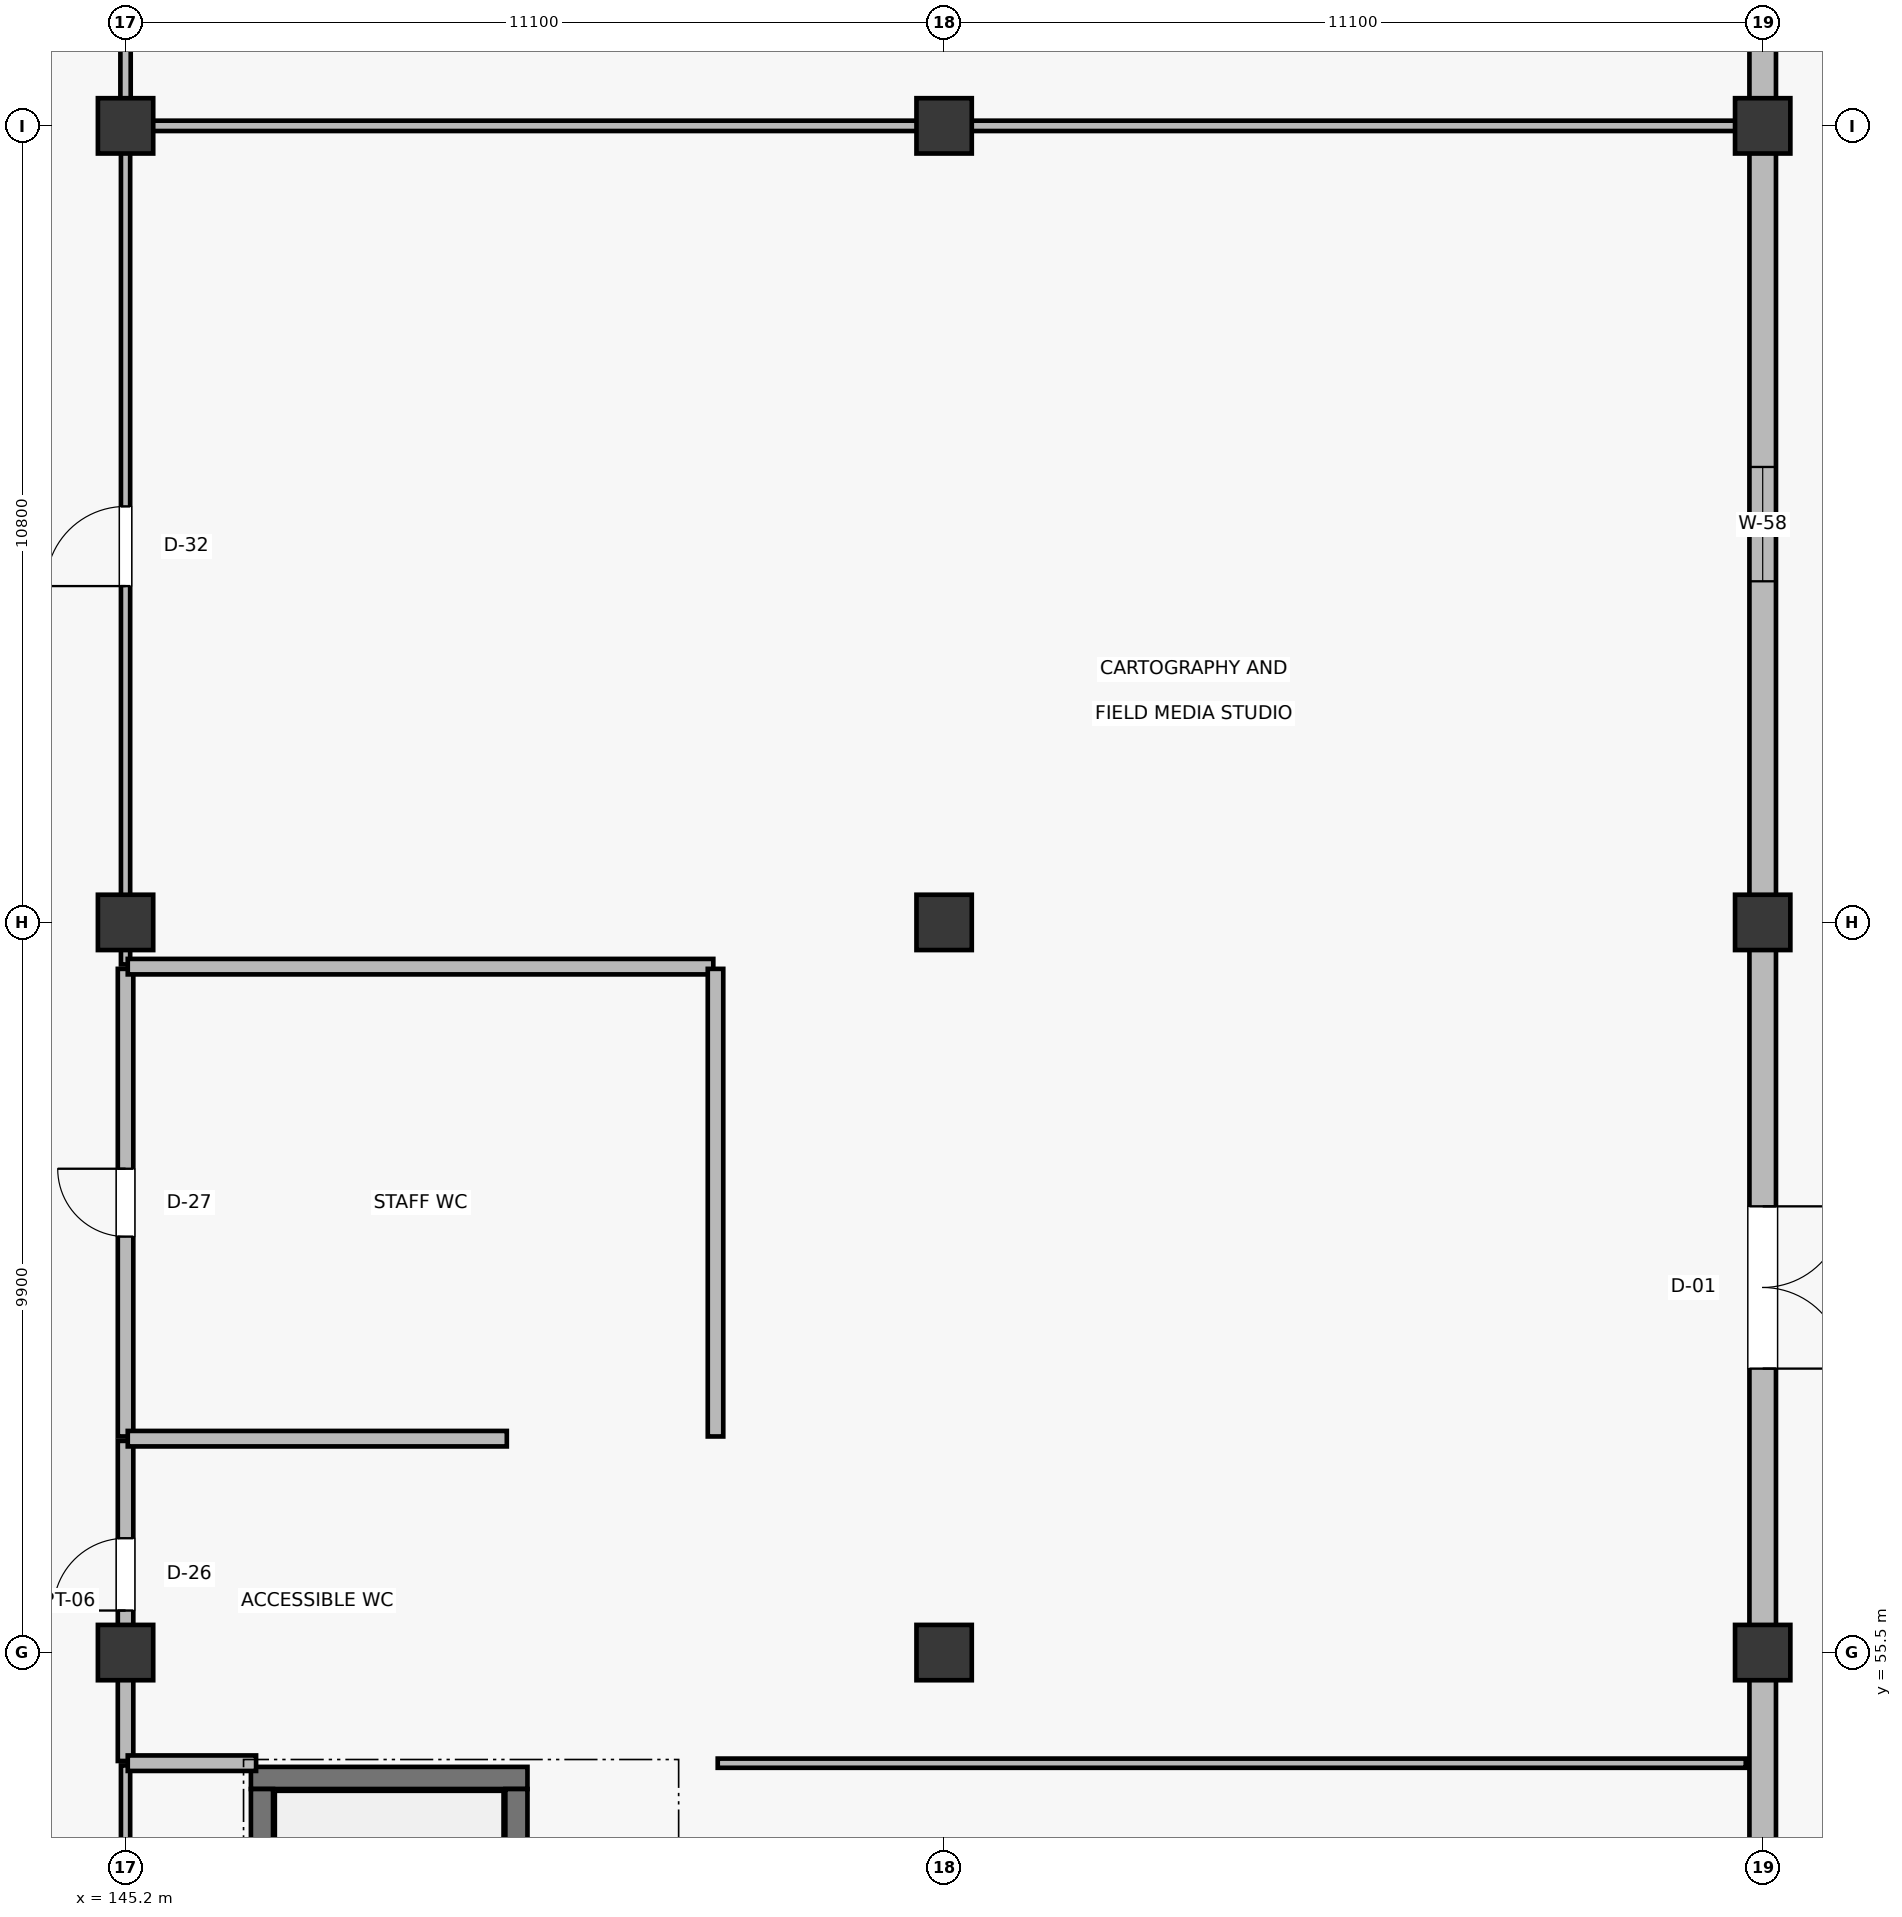
"""IFC4 building model, lengths in metres.
Left out: names, types, materials, properties, quantities, classifications, styles, units other than length and angle.
Written with IfcOpenShell. Run it as: python <this file> out.ifc"""

import sys

from ifc_helpers import new_model, si_unit, direction, frame, frame_2d, origin, origin_2d, place, context, subcontext, project, spatial, rectangle, extrude, element, fill, save


model = new_model("IFC4")
c1 = context("Model", 3, precision=1e-05, world=origin(), true_north=direction((0.0, 1.0)))
c2 = subcontext(c1, "Body", "Model", "MODEL_VIEW")
j1 = project(units=[si_unit("LENGTHUNIT", "METRE"), si_unit("PLANEANGLEUNIT", "RADIAN")], contexts=[c1])
p1 = place(None, origin())
s1 = spatial("IfcSite", under=j1, at=p1, CompositionType="ELEMENT")
p2 = place(p1, origin())
s2 = spatial("IfcBuilding", under=s1, at=p2, CompositionType="ELEMENT")
p3 = place(p2, origin())
s3 = spatial("IfcBuildingStorey", under=s2, at=p3, CompositionType="ELEMENT", Elevation=0.0)
for number, where, z_axis, x_axis in (
    (1, (145.2, 55.5, 0.0), (0.0, 0.0, 1.0), (1.0, 0.0, 0.0)),
    (2, (145.2, 65.4, 0.0), (0.0, 0.0, 1.0), (1.0, 0.0, 0.0)),
    (3, (145.2, 76.2, 0.0), (0.0, 0.0, 1.0), (1.0, 0.0, 0.0)),
    (4, (156.3, 55.5, 0.0), (0.0, 0.0, 1.0), (1.0, 0.0, 0.0)),
    (5, (156.3, 65.4, 0.0), (0.0, 0.0, 1.0), (1.0, 0.0, 0.0)),
    (6, (156.3, 76.2, 0.0), (0.0, 0.0, 1.0), (1.0, 0.0, 0.0)),
    (7, (167.4, 55.5, 0.0), (0.0, 0.0, 1.0), (1.0, 0.0, 0.0)),
    (8, (167.4, 65.4, 0.0), (0.0, 0.0, 1.0), (1.0, 0.0, 0.0)),
    (9, (167.4, 76.2, 0.0), (0.0, 0.0, 1.0), (1.0, 0.0, 0.0)),
):
    element("IfcColumn", number, at=place(p3, frame(where, z_axis=z_axis, x_axis=x_axis)), inside=s3, PredefinedType="COLUMN", context=c2, shape_type="SweptSolid", body=[
        extrude(rectangle(XDim=0.75, YDim=0.75, at=origin_2d()), origin(), (0.0, 0.0, 1.0), 5.4),
    ])
p4 = place(p3, frame((167.4, 45.965, 0.0), z_axis=(0.0, 0.0, 1.0), x_axis=(0.0, 1.0, 0.0)))
e10 = element("IfcWall", 10, at=p4, inside=s3, PredefinedType="SOLIDWALL", context=c2, shape_type="SweptSolid", body=[
    extrude(rectangle(XDim=9.17, YDim=0.36, at=frame_2d((4.585, 0.0))), origin(), (0.0, 0.0, 1.0), 4.415),
])
p5 = place(p4, frame((3.81, 0.0, 0.85)))
e11 = element("IfcOpeningElement", 11, at=p5, cuts=e10, PredefinedType="OPENING", context=c2, shape_type="SweptSolid", body=[
    extrude(rectangle(XDim=1.55, YDim=1.15, at=frame_2d((0.775, 0.575))), frame((0.0, 0.19, 0.0), z_axis=(0.0, -1.0, 0.0), x_axis=(1.0, 0.0, 0.0)), (0.0, 0.0, 1.0), 0.38),
])
p6 = place(p3, frame((167.4, 55.865, 0.0), z_axis=(0.0, 0.0, 1.0), x_axis=(0.0, 1.0, 0.0)))
e12 = element("IfcWall", 12, at=p6, inside=s3, PredefinedType="SOLIDWALL", context=c2, shape_type="SweptSolid", body=[
    extrude(rectangle(XDim=9.17, YDim=0.36, at=frame_2d((4.585, 0.0))), origin(), (0.0, 0.0, 1.0), 4.415),
])
p7 = place(p6, frame((3.485, 0.0, 0.0)))
e13 = element("IfcOpeningElement", 13, at=p7, cuts=e12, PredefinedType="OPENING", context=c2, shape_type="SweptSolid", body=[
    extrude(rectangle(XDim=2.2, YDim=2.5, at=frame_2d((1.1, 1.25))), frame((0.0, 0.19, 0.0), z_axis=(0.0, -1.0, 0.0), x_axis=(1.0, 0.0, 0.0)), (0.0, 0.0, 1.0), 0.38),
])
p8 = place(p3, frame((167.4, 65.765, 0.0), z_axis=(0.0, 0.0, 1.0), x_axis=(0.0, 1.0, 0.0)))
e14 = element("IfcWall", 14, at=p8, inside=s3, PredefinedType="SOLIDWALL", context=c2, shape_type="SweptSolid", body=[
    extrude(rectangle(XDim=10.07, YDim=0.36, at=frame_2d((5.035, 0.0))), origin(), (0.0, 0.0, 1.0), 4.415),
])
p9 = place(p8, frame((4.26, 0.0, 0.85)))
e15 = element("IfcOpeningElement", 15, at=p9, cuts=e14, PredefinedType="OPENING", context=c2, shape_type="SweptSolid", body=[
    extrude(rectangle(XDim=1.55, YDim=1.35, at=frame_2d((0.775, 0.675))), frame((0.0, 0.19, 0.0), z_axis=(0.0, -1.0, 0.0), x_axis=(1.0, 0.0, 0.0)), (0.0, 0.0, 1.0), 0.38),
])
p10 = place(p3, frame((167.4, 76.565, 0.0), z_axis=(0.0, 0.0, 1.0), x_axis=(0.0, 1.0, 0.0)))
e16 = element("IfcWall", 16, at=p10, inside=s3, PredefinedType="SOLIDWALL", context=c2, shape_type="SweptSolid", body=[
    extrude(rectangle(XDim=6.58, YDim=0.36, at=frame_2d((3.29, 0.0))), origin(), (0.0, 0.0, 1.0), 4.445),
])
p11 = place(p10, frame((2.715, 0.0, 0.85)))
e17 = element("IfcOpeningElement", 17, at=p11, cuts=e16, PredefinedType="OPENING", context=c2, shape_type="SweptSolid", body=[
    extrude(rectangle(XDim=1.15, YDim=1.35, at=frame_2d((0.575, 0.675))), frame((0.0, 0.19, 0.0), z_axis=(0.0, -1.0, 0.0), x_axis=(1.0, 0.0, 0.0)), (0.0, 0.0, 1.0), 0.38),
])
p12 = place(p3, frame((146.9, 53.8, 0.0), z_axis=(0.0, 0.0, 1.0), x_axis=(1.0, 0.0, 0.0)))
e18 = element("IfcWall", 18, at=p12, inside=s3, PredefinedType="SHEAR", context=c2, shape_type="SweptSolid", body=[
    extrude(rectangle(XDim=3.75, YDim=0.3, at=frame_2d((1.875, 0.0))), origin(), (0.0, 0.0, 1.0), 5.18),
])
for number, where, z_axis, x_axis in (
    (19, (147.05, 46.6, 0.0), (0.0, 0.0, 1.0), (0.0, 1.0, 0.0)),
    (20, (150.5, 46.6, 0.0), (0.0, 0.0, 1.0), (0.0, 1.0, 0.0)),
):
    element("IfcWall", number, at=place(p3, frame(where, z_axis=z_axis, x_axis=x_axis)), inside=s3, PredefinedType="SHEAR", context=c2, shape_type="SweptSolid", body=[
        extrude(rectangle(XDim=7.05, YDim=0.3, at=frame_2d((3.525, 0.0))), origin(), (0.0, 0.0, 1.0), 5.18),
    ])
p13 = place(p3, frame((145.2, 54.03, 0.0), z_axis=(0.0, 0.0, 1.0), x_axis=(0.0, 1.0, 0.0)))
e21 = element("IfcWall", 21, at=p13, inside=s3, PredefinedType="PLUMBINGWALL", context=c2, shape_type="SweptSolid", body=[
    extrude(rectangle(XDim=4.34, YDim=0.21, at=frame_2d((2.17, 0.0))), origin(), (0.0, 0.0, 1.0), 4.265),
])
p14 = place(p13, frame((2.04, 0.0, 0.0)))
e22 = element("IfcOpeningElement", 22, at=p14, cuts=e21, PredefinedType="OPENING", context=c2, shape_type="SweptSolid", body=[
    extrude(rectangle(XDim=0.98, YDim=2.1, at=frame_2d((0.49, 1.05))), frame((0.0, 0.115, 0.0), z_axis=(0.0, -1.0, 0.0), x_axis=(1.0, 0.0, 0.0)), (0.0, 0.0, 1.0), 0.23),
])
p15 = place(p3, frame((145.2, 58.43, 0.0), z_axis=(0.0, 0.0, 1.0), x_axis=(0.0, 1.0, 0.0)))
e23 = element("IfcWall", 23, at=p15, inside=s3, PredefinedType="PLUMBINGWALL", context=c2, shape_type="SweptSolid", body=[
    extrude(rectangle(XDim=6.34, YDim=0.21, at=frame_2d((3.17, 0.0))), origin(), (0.0, 0.0, 1.0), 4.265),
])
p16 = place(p15, frame((2.71, 0.0, 0.0)))
e24 = element("IfcOpeningElement", 24, at=p16, cuts=e23, PredefinedType="OPENING", context=c2, shape_type="SweptSolid", body=[
    extrude(rectangle(XDim=0.92, YDim=2.1, at=frame_2d((0.46, 1.05))), frame((0.0, 0.115, 0.0), z_axis=(0.0, -1.0, 0.0), x_axis=(1.0, 0.0, 0.0)), (0.0, 0.0, 1.0), 0.23),
])
p17 = place(p3, frame((145.2, 64.83, 0.0), z_axis=(0.0, 0.0, 1.0), x_axis=(0.0, 1.0, 0.0)))
e25 = element("IfcWall", 25, at=p17, inside=s3, PredefinedType="PARTITIONING", context=c2, shape_type="SweptSolid", body=[
    extrude(rectangle(XDim=11.34, YDim=0.125, at=frame_2d((5.67, 0.0))), origin(), (0.0, 0.0, 1.0), 4.265),
])
p18 = place(p17, frame((5.13, 0.0, 0.0)))
e26 = element("IfcOpeningElement", 26, at=p18, cuts=e25, PredefinedType="OPENING", context=c2, shape_type="SweptSolid", body=[
    extrude(rectangle(XDim=1.08, YDim=2.15, at=frame_2d((0.54, 1.075))), frame((0.0, 0.073, 0.0), z_axis=(0.0, -1.0, 0.0), x_axis=(1.0, 0.0, 0.0)), (0.0, 0.0, 1.0), 0.145),
])
p19 = place(p3, frame((145.2, 76.23, 0.0), z_axis=(0.0, 0.0, 1.0), x_axis=(0.0, 1.0, 0.0)))
e27 = element("IfcWall", 27, at=p19, inside=s3, PredefinedType="PARTITIONING", context=c2, shape_type="SweptSolid", body=[
    extrude(rectangle(XDim=23.94, YDim=0.14, at=frame_2d((11.97, 0.0))), origin(), (0.0, 0.0, 1.0), 4.495),
])
p20 = place(p19, frame((11.395, 0.0, 0.0)))
e28 = element("IfcOpeningElement", 28, at=p20, cuts=e27, PredefinedType="OPENING", context=c2, shape_type="SweptSolid", body=[
    extrude(rectangle(XDim=1.15, YDim=2.15, at=frame_2d((0.575, 1.075))), frame((0.0, 0.08, 0.0), z_axis=(0.0, -1.0, 0.0), x_axis=(1.0, 0.0, 0.0)), (0.0, 0.0, 1.0), 0.16),
])
p21 = place(p3, frame((145.2, 46.48, 0.0), z_axis=(0.0, 0.0, 1.0), x_axis=(0.0, 1.0, 0.0)))
e29 = element("IfcWall", 29, at=p21, inside=s3, PredefinedType="PARTITIONING", context=c2, shape_type="SweptSolid", body=[
    extrude(rectangle(XDim=7.49, YDim=0.125, at=frame_2d((3.745, 0.0))), origin(), (0.0, 0.0, 1.0), 4.265),
])
p22 = place(p21, frame((3.245, 0.0, 0.0)))
e30 = element("IfcOpeningElement", 30, at=p22, cuts=e29, PredefinedType="OPENING", context=c2, shape_type="SweptSolid", body=[
    extrude(rectangle(XDim=1.0, YDim=2.15, at=frame_2d((0.5, 1.075))), frame((0.0, 0.073, 0.0), z_axis=(0.0, -1.0, 0.0), x_axis=(1.0, 0.0, 0.0)), (0.0, 0.0, 1.0), 0.145),
])
p23 = place(p3, frame((153.23, 54.0, 0.0), z_axis=(0.0, 0.0, 1.0), x_axis=(1.0, 0.0, 0.0)))
e31 = element("IfcWall", 31, at=p23, inside=s3, PredefinedType="PARTITIONING", context=c2, shape_type="SweptSolid", body=[
    extrude(rectangle(XDim=13.94, YDim=0.125, at=frame_2d((6.97, 0.0))), origin(), (0.0, 0.0, 1.0), 4.265),
])
p24 = place(p3, frame((145.23, 58.4, 0.0), z_axis=(0.0, 0.0, 1.0), x_axis=(1.0, 0.0, 0.0)))
e32 = element("IfcWall", 32, at=p24, inside=s3, PredefinedType="PLUMBINGWALL", context=c2, shape_type="SweptSolid", body=[
    extrude(rectangle(XDim=5.14, YDim=0.21, at=frame_2d((2.57, 0.0))), origin(), (0.0, 0.0, 1.0), 4.265),
])
p25 = place(p3, frame((145.23, 54.0, 0.0), z_axis=(0.0, 0.0, 1.0), x_axis=(1.0, 0.0, 0.0)))
e33 = element("IfcWall", 33, at=p25, inside=s3, PredefinedType="PLUMBINGWALL", context=c2, shape_type="SweptSolid", body=[
    extrude(rectangle(XDim=1.74, YDim=0.21, at=frame_2d((0.87, 0.0))), origin(), (0.0, 0.0, 1.0), 4.265),
])
p26 = place(p3, frame((145.23, 64.8, 0.0), z_axis=(0.0, 0.0, 1.0), x_axis=(1.0, 0.0, 0.0)))
e34 = element("IfcWall", 34, at=p26, inside=s3, PredefinedType="PLUMBINGWALL", context=c2, shape_type="SweptSolid", body=[
    extrude(rectangle(XDim=7.94, YDim=0.21, at=frame_2d((3.97, 0.0))), origin(), (0.0, 0.0, 1.0), 4.265),
])
p27 = place(p3, frame((153.2, 58.43, 0.0), z_axis=(0.0, 0.0, 1.0), x_axis=(0.0, 1.0, 0.0)))
e35 = element("IfcWall", 35, at=p27, inside=s3, PredefinedType="PLUMBINGWALL", context=c2, shape_type="SweptSolid", body=[
    extrude(rectangle(XDim=6.34, YDim=0.21, at=frame_2d((3.17, 0.0))), origin(), (0.0, 0.0, 1.0), 5.08),
])
p28 = place(p3, frame((145.23, 76.2, 0.0), z_axis=(0.0, 0.0, 1.0), x_axis=(1.0, 0.0, 0.0)))
e36 = element("IfcWall", 36, at=p28, inside=s3, PredefinedType="PARTITIONING", context=c2, shape_type="SweptSolid", body=[
    extrude(rectangle(XDim=21.94, YDim=0.14, at=frame_2d((10.97, 0.0))), origin(), (0.0, 0.0, 1.0), 4.095),
])
p29 = place(p7, frame((2.2, 0.0, 0.0), z_axis=(0.0, 0.0, 1.0), x_axis=(-1.0, 0.0, 0.0)))
e37 = element("IfcDoor", 37, at=p29, inside=s3, OperationType="DOUBLE_DOOR_SINGLE_SWING", PredefinedType="DOOR", context=c2, shape_type="SweptSolid", body=[
    extrude(rectangle(XDim=2.2, YDim=2.5, at=frame_2d((1.1, 1.25))), frame((0.0, 0.025, 0.0), z_axis=(0.0, -1.0, 0.0), x_axis=(1.0, 0.0, 0.0)), (0.0, 0.0, 1.0), 0.05),
])
fill(e13, e37)
p30 = place(p9, frame((1.55, 0.0, 0.0), z_axis=(0.0, 0.0, 1.0), x_axis=(-1.0, 0.0, 0.0)))
e38 = element("IfcWindow", 38, at=p30, inside=s3, PartitioningType="DOUBLE_PANEL_VERTICAL", PredefinedType="WINDOW", context=c2, shape_type="SweptSolid", body=[
    extrude(rectangle(XDim=1.55, YDim=1.35, at=frame_2d((0.775, 0.675))), frame((0.0, 0.03, 0.0), z_axis=(0.0, -1.0, 0.0), x_axis=(1.0, 0.0, 0.0)), (0.0, 0.0, 1.0), 0.06),
])
fill(e15, e38)
p31 = place(p14, origin())
e39 = element("IfcDoor", 39, at=p31, inside=s3, OperationType="SINGLE_SWING_LEFT", PredefinedType="DOOR", context=c2, shape_type="SweptSolid", body=[
    extrude(rectangle(XDim=0.98, YDim=2.1, at=frame_2d((0.49, 1.05))), frame((0.0, 0.025, 0.0), z_axis=(0.0, -1.0, 0.0), x_axis=(1.0, 0.0, 0.0)), (0.0, 0.0, 1.0), 0.05),
])
fill(e22, e39)
p32 = place(p16, origin())
e40 = element("IfcDoor", 40, at=p32, inside=s3, OperationType="SINGLE_SWING_RIGHT", PredefinedType="DOOR", context=c2, shape_type="SweptSolid", body=[
    extrude(rectangle(XDim=0.92, YDim=2.1, at=frame_2d((0.46, 1.05))), frame((0.0, 0.025, 0.0), z_axis=(0.0, -1.0, 0.0), x_axis=(1.0, 0.0, 0.0)), (0.0, 0.0, 1.0), 0.05),
])
fill(e24, e40)
p33 = place(p18, origin())
e41 = element("IfcDoor", 41, at=p33, inside=s3, OperationType="SINGLE_SWING_LEFT", PredefinedType="DOOR", context=c2, shape_type="SweptSolid", body=[
    extrude(rectangle(XDim=1.08, YDim=2.15, at=frame_2d((0.54, 1.075))), frame((0.0, 0.025, 0.0), z_axis=(0.0, -1.0, 0.0), x_axis=(1.0, 0.0, 0.0)), (0.0, 0.0, 1.0), 0.05),
])
fill(e26, e41)
save(model, sys.argv[1])
